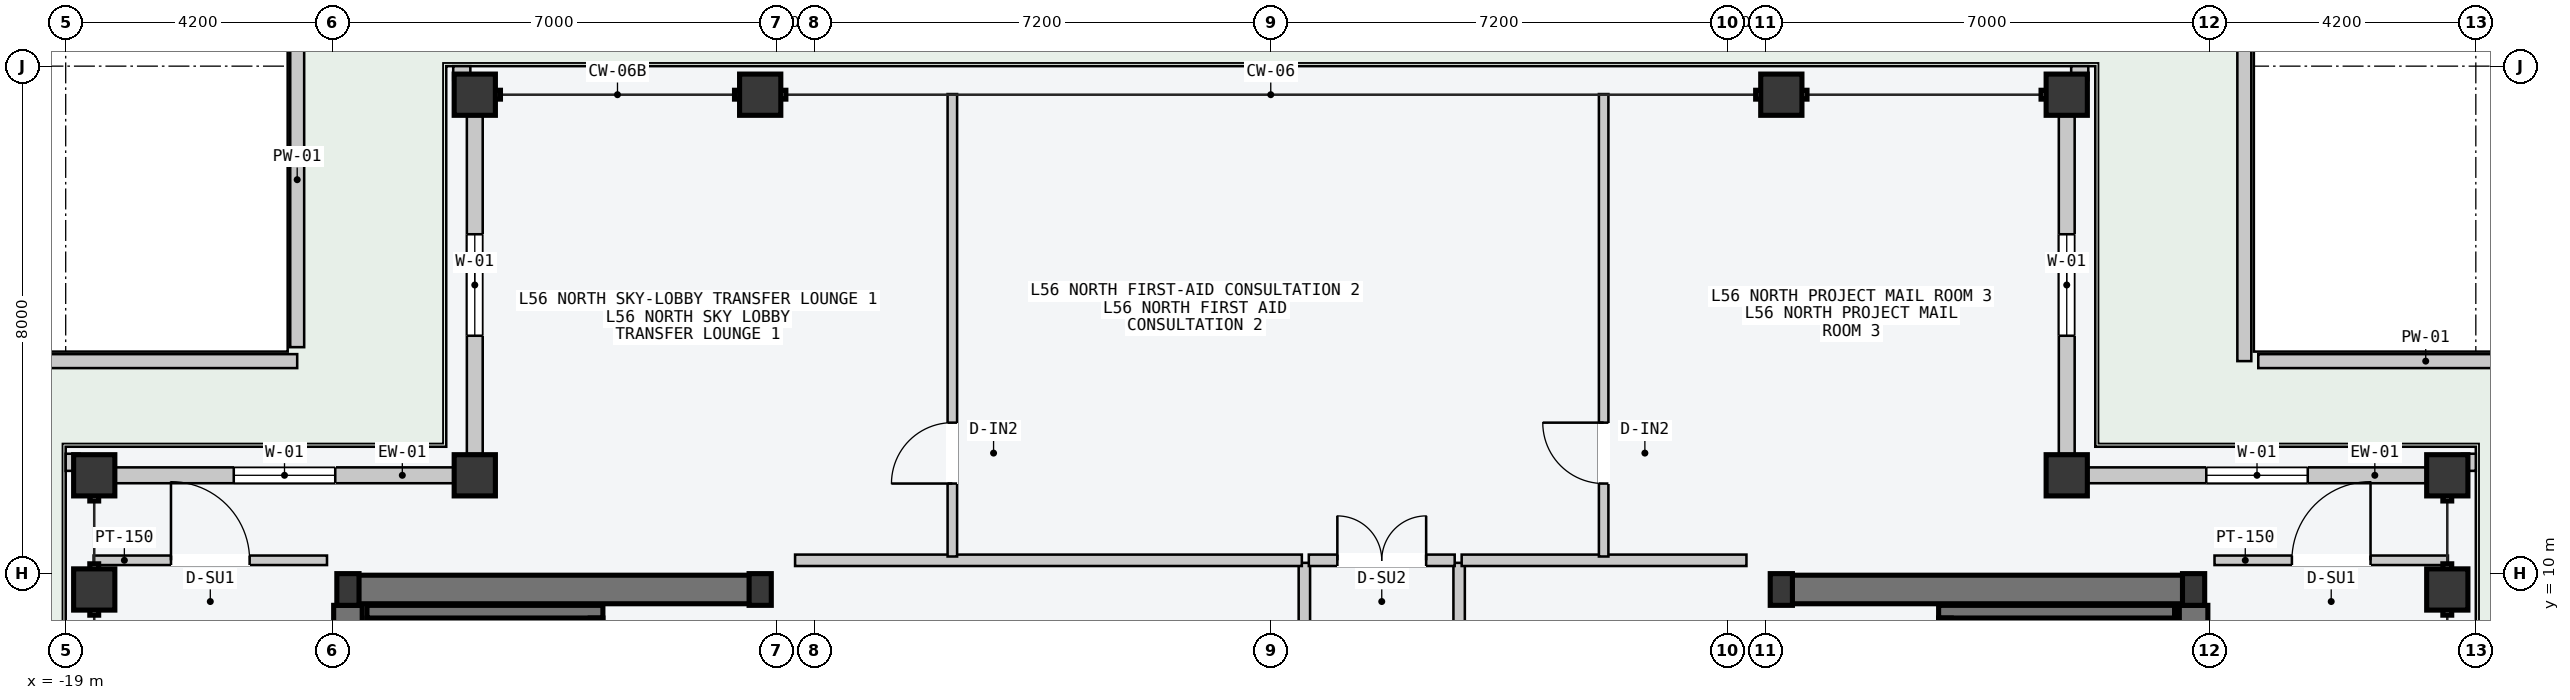
"""IFC4 building model, lengths in metres.
Left out: names, types, materials, properties, quantities, classifications, styles, units other than length and angle.
Written with IfcOpenShell. Run it as: python <this file> out.ifc"""

import sys

from ifc_helpers import new_model, si_unit, direction, frame, frame_2d, origin, origin_2d, place, context, subcontext, project, spatial, rectangle, hollow_rectangle, i_section, extrude, element, fill, save


model = new_model("IFC4")
c1 = context("Model", 3, precision=1e-05, world=origin(), true_north=direction((0.0, 1.0)))
c2 = subcontext(c1, "Body", "Model", "MODEL_VIEW")
j1 = project(units=[si_unit("LENGTHUNIT", "METRE"), si_unit("PLANEANGLEUNIT", "RADIAN")], contexts=[c1])
p1 = place(None, origin())
s1 = spatial("IfcSite", under=j1, at=p1, CompositionType="ELEMENT")
p2 = place(p1, origin())
s2 = spatial("IfcBuilding", under=s1, at=p2, CompositionType="ELEMENT")
p3 = place(p2, frame((0.0, 0.0, 213.9)))
s3 = spatial("IfcBuildingStorey", under=s2, at=p3, CompositionType="ELEMENT", Elevation=213.9)
p4 = place(p3, frame((-14.53, 9.75, -0.2), z_axis=(0.0, 0.0, 1.0), x_axis=(1.0, 0.0, 0.0)))
e1 = element("IfcWall", 1, at=p4, inside=s3, PredefinedType="SHEAR", context=c2, shape_type="SweptSolid", body=[
    extrude(rectangle(XDim=6.46, YDim=0.45, at=frame_2d((3.23, 0.0))), origin(), (0.0, 0.0, 1.0), 4.5),
])
p5 = place(p3, frame((-14.55, 0.25, -0.2), z_axis=(0.0, 0.0, 1.0), x_axis=(0.0, 1.0, 0.0)))
e2 = element("IfcWall", 2, at=p5, inside=s3, PredefinedType="SHEAR", context=c2, shape_type="SweptSolid", body=[
    extrude(rectangle(XDim=9.25, YDim=0.45, at=frame_2d((4.625, 0.0))), origin(), (0.0, 0.0, 1.0), 4.5),
])
p6 = place(p3, frame((8.07, 9.75, -0.2), z_axis=(0.0, 0.0, 1.0), x_axis=(1.0, 0.0, 0.0)))
e3 = element("IfcWall", 3, at=p6, inside=s3, PredefinedType="SHEAR", context=c2, shape_type="SweptSolid", body=[
    extrude(rectangle(XDim=6.46, YDim=0.45, at=frame_2d((3.23, 0.0))), origin(), (0.0, 0.0, 1.0), 4.5),
])
p7 = place(p3, frame((14.55, 0.25, -0.2), z_axis=(0.0, 0.0, 1.0), x_axis=(0.0, 1.0, 0.0)))
e4 = element("IfcWall", 4, at=p7, inside=s3, PredefinedType="SHEAR", context=c2, shape_type="SweptSolid", body=[
    extrude(rectangle(XDim=9.25, YDim=0.45, at=frame_2d((4.625, 0.0))), origin(), (0.0, 0.0, 1.0), 4.5),
])
for number, where, z_axis, x_axis in (
    (5, (-14.15, 1.5, -0.2), (0.0, 0.0, 1.0), (0.0, 1.0, 0.0)),
    (6, (14.15, 1.5, -0.2), (0.0, 0.0, 1.0), (0.0, 1.0, 0.0)),
):
    element("IfcWall", number, at=place(p3, frame(where, z_axis=z_axis, x_axis=x_axis)), inside=s3, PredefinedType="SOLIDWALL", context=c2, shape_type="SweptSolid", body=[
        extrude(rectangle(XDim=7.8, YDim=0.2, at=frame_2d((3.9, 0.0))), origin(), (0.0, 0.0, 1.0), 4.5),
    ])
p8 = place(p3, frame((-14.25, 9.4, -0.2), z_axis=(0.0, 0.0, 1.0), x_axis=(1.0, 0.0, 0.0)))
e7 = element("IfcWall", 7, at=p8, inside=s3, PredefinedType="SOLIDWALL", context=c2, shape_type="SweptSolid", body=[
    extrude(rectangle(XDim=3.72, YDim=0.2, at=frame_2d((1.86, 0.0))), origin(), (0.0, 0.0, 1.0), 4.5),
])
p9 = place(p3, frame((-10.63, 1.5, -0.2), z_axis=(0.0, 0.0, 1.0), x_axis=(0.0, 1.0, 0.0)))
e8 = element("IfcWall", 8, at=p9, inside=s3, PredefinedType="SOLIDWALL", context=c2, shape_type="SweptSolid", body=[
    extrude(rectangle(XDim=7.8, YDim=0.2, at=frame_2d((3.9, 0.0))), origin(), (0.0, 0.0, 1.0), 4.5),
])
p10 = place(p3, frame((10.53, 9.4, -0.2), z_axis=(0.0, 0.0, 1.0), x_axis=(1.0, 0.0, 0.0)))
e9 = element("IfcWall", 9, at=p10, inside=s3, PredefinedType="SOLIDWALL", context=c2, shape_type="SweptSolid", body=[
    extrude(rectangle(XDim=3.72, YDim=0.2, at=frame_2d((1.86, 0.0))), origin(), (0.0, 0.0, 1.0), 4.5),
])
p11 = place(p3, frame((10.63, 1.5, -0.2), z_axis=(0.0, 0.0, 1.0), x_axis=(0.0, 1.0, 0.0)))
e10 = element("IfcWall", 10, at=p11, inside=s3, PredefinedType="SOLIDWALL", context=c2, shape_type="SweptSolid", body=[
    extrude(rectangle(XDim=7.8, YDim=0.2, at=frame_2d((3.9, 0.0))), origin(), (0.0, 0.0, 1.0), 4.5),
])
for number, where, z_axis, x_axis in (
    (11, (-14.55, 9.75, 0.0), (0.0, 0.0, 1.0), (1.0, 0.0, 0.0)),
    (12, (-8.05, 9.75, 0.0), (0.0, 0.0, 1.0), (1.0, 0.0, 0.0)),
    (13, (8.05, 9.75, 0.0), (0.0, 0.0, 1.0), (1.0, 0.0, 0.0)),
    (14, (14.55, 9.75, 0.0), (0.0, 0.0, 1.0), (1.0, 0.0, 0.0)),
):
    element("IfcColumn", number, at=place(p3, frame(where, z_axis=z_axis, x_axis=x_axis)), inside=s3, PredefinedType="COLUMN", context=c2, shape_type="SweptSolid", body=[
        extrude(i_section(OverallWidth=0.35, OverallDepth=0.5, WebThickness=0.02, FlangeThickness=0.032, at=origin_2d()), origin(), (0.0, 0.0, 1.0), 4.5),
    ])
for number, where, z_axis, x_axis in (
    (15, (-12.55, 17.55, -0.2), (0.0, 0.0, 1.0), (1.0, 0.0, 0.0)),
    (16, (-8.05, 17.55, -0.2), (0.0, 0.0, 1.0), (1.0, 0.0, 0.0)),
    (17, (8.05, 17.55, -0.2), (0.0, 0.0, 1.0), (1.0, 0.0, 0.0)),
    (18, (12.55, 17.55, -0.2), (0.0, 0.0, 1.0), (1.0, 0.0, 0.0)),
    (19, (-18.55, 9.75, -0.2), (0.0, 0.0, 1.0), (0.0, 1.0, 0.0)),
    (20, (-18.55, 11.55, -0.2), (0.0, 0.0, 1.0), (0.0, 1.0, 0.0)),
    (21, (18.55, 9.75, -0.2), (0.0, 0.0, 1.0), (0.0, 1.0, 0.0)),
    (22, (18.55, 11.55, -0.2), (0.0, 0.0, 1.0), (0.0, 1.0, 0.0)),
    (23, (-12.55, 11.55, -0.2), (0.0, 0.0, 1.0), (1.0, 0.0, 0.0)),
    (24, (12.55, 11.55, -0.2), (0.0, 0.0, 1.0), (1.0, 0.0, 0.0)),
):
    element("IfcColumn", number, at=place(p3, frame(where, z_axis=z_axis, x_axis=x_axis)), inside=s3, PredefinedType="COLUMN", context=c2, shape_type="SweptSolid", body=[
        extrude(hollow_rectangle(XDim=0.65, YDim=0.65, WallThickness=0.028, at=origin_2d()), origin(), (0.0, 0.0, 1.0), 4.7),
    ])
p12 = place(p3, frame((-18.215, 11.55, 0.0), z_axis=(0.0, 0.0, 1.0), x_axis=(1.0, 0.0, 0.0)))
e25 = element("IfcWall", 25, at=p12, inside=s3, PredefinedType="STANDARD", context=c2, shape_type="SweptSolid", body=[
    extrude(rectangle(XDim=5.33, YDim=0.25, at=frame_2d((2.665, 0.0))), origin(), (0.0, 0.0, 1.0), 3.75),
])
p13 = place(p12, frame((1.865, 0.0, 0.85)))
e26 = element("IfcOpeningElement", 26, at=p13, cuts=e25, PredefinedType="OPENING", context=c2, shape_type="SweptSolid", body=[
    extrude(rectangle(XDim=1.6, YDim=2.0, at=frame_2d((0.8, 1.0))), frame((0.0, 0.135, 0.0), z_axis=(0.0, -1.0, 0.0), x_axis=(1.0, 0.0, 0.0)), (0.0, 0.0, 1.0), 0.27),
])
p14 = place(p3, frame((-12.55, 11.885, 0.0), z_axis=(0.0, 0.0, 1.0), x_axis=(0.0, 1.0, 0.0)))
e27 = element("IfcWall", 27, at=p14, inside=s3, PredefinedType="STANDARD", context=c2, shape_type="SweptSolid", body=[
    extrude(rectangle(XDim=5.33, YDim=0.25, at=frame_2d((2.665, 0.0))), origin(), (0.0, 0.0, 1.0), 3.75),
])
p15 = place(p14, frame((1.865, 0.0, 0.85)))
e28 = element("IfcOpeningElement", 28, at=p15, cuts=e27, PredefinedType="OPENING", context=c2, shape_type="SweptSolid", body=[
    extrude(rectangle(XDim=1.6, YDim=2.0, at=frame_2d((0.8, 1.0))), frame((0.0, 0.135, 0.0), z_axis=(0.0, -1.0, 0.0), x_axis=(1.0, 0.0, 0.0)), (0.0, 0.0, 1.0), 0.27),
])
p16 = place(p3, frame((12.885, 11.55, 0.0), z_axis=(0.0, 0.0, 1.0), x_axis=(1.0, 0.0, 0.0)))
e29 = element("IfcWall", 29, at=p16, inside=s3, PredefinedType="STANDARD", context=c2, shape_type="SweptSolid", body=[
    extrude(rectangle(XDim=5.33, YDim=0.25, at=frame_2d((2.665, 0.0))), origin(), (0.0, 0.0, 1.0), 3.75),
])
p17 = place(p16, frame((1.865, 0.0, 0.85)))
e30 = element("IfcOpeningElement", 30, at=p17, cuts=e29, PredefinedType="OPENING", context=c2, shape_type="SweptSolid", body=[
    extrude(rectangle(XDim=1.6, YDim=2.0, at=frame_2d((0.8, 1.0))), frame((0.0, 0.135, 0.0), z_axis=(0.0, -1.0, 0.0), x_axis=(1.0, 0.0, 0.0)), (0.0, 0.0, 1.0), 0.27),
])
p18 = place(p3, frame((12.55, 11.885, 0.0), z_axis=(0.0, 0.0, 1.0), x_axis=(0.0, 1.0, 0.0)))
e31 = element("IfcWall", 31, at=p18, inside=s3, PredefinedType="STANDARD", context=c2, shape_type="SweptSolid", body=[
    extrude(rectangle(XDim=5.33, YDim=0.25, at=frame_2d((2.665, 0.0))), origin(), (0.0, 0.0, 1.0), 3.75),
])
p19 = place(p18, frame((1.865, 0.0, 0.85)))
e32 = element("IfcOpeningElement", 32, at=p19, cuts=e31, PredefinedType="OPENING", context=c2, shape_type="SweptSolid", body=[
    extrude(rectangle(XDim=1.6, YDim=2.0, at=frame_2d((0.8, 1.0))), frame((0.0, 0.135, 0.0), z_axis=(0.0, -1.0, 0.0), x_axis=(1.0, 0.0, 0.0)), (0.0, 0.0, 1.0), 0.27),
])
for number, where, z_axis, x_axis in (
    (33, (-12.89, 17.89, 0.0), (0.0, 0.0, 1.0), (1.0, 0.0, 0.0)),
    (34, (-18.89, 11.62, 0.0), (0.0, 0.0, 1.0), (0.0, 1.0, 0.0)),
    (35, (12.62, 17.89, 0.0), (0.0, 0.0, 1.0), (1.0, 0.0, 0.0)),
    (36, (18.89, 11.62, 0.0), (0.0, 0.0, 1.0), (0.0, 1.0, 0.0)),
):
    element("IfcWall", number, at=place(p3, frame(where, z_axis=z_axis, x_axis=x_axis)), inside=s3, PredefinedType="PARAPET", context=c2, shape_type="SweptSolid", body=[
        extrude(rectangle(XDim=0.27, YDim=0.22, at=frame_2d((0.135, 0.0))), origin(), (0.0, 0.0, 1.0), 1.2),
    ])
p20 = place(p3, frame((20.85, 13.35, 0.0), z_axis=(0.0, 0.0, 1.0), x_axis=(-1.0, 0.0, 0.0)))
e37 = element("IfcWall", 37, at=p20, inside=s3, PredefinedType="PARAPET", context=c2, shape_type="SweptSolid", body=[
    extrude(rectangle(XDim=5.28, YDim=0.22, at=frame_2d((2.64, 0.0))), origin(), (0.0, 0.0, 1.0), 1.2),
])
p21 = place(p3, frame((15.35, 13.35, 0.0), z_axis=(0.0, 0.0, 1.0), x_axis=(0.0, 1.0, 0.0)))
e38 = element("IfcWall", 38, at=p21, inside=s3, PredefinedType="PARAPET", context=c2, shape_type="SweptSolid", body=[
    extrude(rectangle(XDim=5.28, YDim=0.22, at=frame_2d((2.64, 0.0))), origin(), (0.0, 0.0, 1.0), 1.2),
])
p22 = place(p3, frame((-15.35, 18.85, 0.0), z_axis=(0.0, 0.0, 1.0), x_axis=(0.0, -1.0, 0.0)))
e39 = element("IfcWall", 39, at=p22, inside=s3, PredefinedType="PARAPET", context=c2, shape_type="SweptSolid", body=[
    extrude(rectangle(XDim=5.28, YDim=0.22, at=frame_2d((2.64, 0.0))), origin(), (0.0, 0.0, 1.0), 1.2),
])
p23 = place(p3, frame((-15.35, 13.35, 0.0), z_axis=(0.0, 0.0, 1.0), x_axis=(-1.0, 0.0, 0.0)))
e40 = element("IfcWall", 40, at=p23, inside=s3, PredefinedType="PARAPET", context=c2, shape_type="SweptSolid", body=[
    extrude(rectangle(XDim=5.28, YDim=0.22, at=frame_2d((2.64, 0.0))), origin(), (0.0, 0.0, 1.0), 1.2),
])
p24 = place(p3, frame((0.53, -3.5, 0.0), z_axis=(0.0, 0.0, 1.0), x_axis=(0.0, 1.0, 0.0)))
e41 = element("IfcWall", 41, at=p24, inside=s3, PredefinedType="PARTITIONING", context=c2, shape_type="SweptSolid", body=[
    extrude(rectangle(XDim=13.67, YDim=0.18, at=frame_2d((6.835, 0.0))), origin(), (0.0, 0.0, 1.0), 4.3),
])
p25 = place(p24, frame((6.1, 0.0, 0.0)))
e42 = element("IfcOpeningElement", 42, at=p25, cuts=e41, PredefinedType="OPENING", context=c2, shape_type="SweptSolid", body=[
    extrude(rectangle(XDim=1.24, YDim=2.24, at=frame_2d((0.62, 1.12))), frame((0.0, 0.1, 0.0), z_axis=(0.0, -1.0, 0.0), x_axis=(1.0, 0.0, 0.0)), (0.0, 0.0, 1.0), 0.2),
])
p26 = place(p24, frame((1.6, 0.0, 0.0)))
e43 = element("IfcOpeningElement", 43, at=p26, cuts=e41, PredefinedType="OPENING", context=c2, shape_type="SweptSolid", body=[
    extrude(rectangle(XDim=0.96, YDim=2.18, at=frame_2d((0.48, 1.09))), frame((0.0, 0.1, 0.0), z_axis=(0.0, -1.0, 0.0), x_axis=(1.0, 0.0, 0.0)), (0.0, 0.0, 1.0), 0.2),
])
p27 = place(p3, frame((-7.5, 10.21, 0.0), z_axis=(0.0, 0.0, 1.0), x_axis=(1.0, 0.0, 0.0)))
e44 = element("IfcWall", 44, at=p27, inside=s3, PredefinedType="PARTITIONING", context=c2, shape_type="SweptSolid", body=[
    extrude(rectangle(XDim=7.99, YDim=0.18, at=frame_2d((3.995, 0.0))), origin(), (0.0, 0.0, 1.0), 4.3),
])
p28 = place(p3, frame((2.97, -3.5, 0.0), z_axis=(0.0, 0.0, 1.0), x_axis=(0.0, 1.0, 0.0)))
e45 = element("IfcWall", 45, at=p28, inside=s3, PredefinedType="PARTITIONING", context=c2, shape_type="SweptSolid", body=[
    extrude(rectangle(XDim=13.67, YDim=0.18, at=frame_2d((6.835, 0.0))), origin(), (0.0, 0.0, 1.0), 4.3),
])
p29 = place(p28, frame((6.1, 0.0, 0.0)))
e46 = element("IfcOpeningElement", 46, at=p29, cuts=e45, PredefinedType="OPENING", context=c2, shape_type="SweptSolid", body=[
    extrude(rectangle(XDim=1.24, YDim=2.24, at=frame_2d((0.62, 1.12))), frame((0.0, 0.1, 0.0), z_axis=(0.0, -1.0, 0.0), x_axis=(1.0, 0.0, 0.0)), (0.0, 0.0, 1.0), 0.2),
])
p30 = place(p28, frame((1.6, 0.0, 0.0)))
e47 = element("IfcOpeningElement", 47, at=p30, cuts=e45, PredefinedType="OPENING", context=c2, shape_type="SweptSolid", body=[
    extrude(rectangle(XDim=0.96, YDim=2.18, at=frame_2d((0.48, 1.09))), frame((0.0, 0.1, 0.0), z_axis=(0.0, -1.0, 0.0), x_axis=(1.0, 0.0, 0.0)), (0.0, 0.0, 1.0), 0.2),
])
p31 = place(p3, frame((3.01, 10.21, 0.0), z_axis=(0.0, 0.0, 1.0), x_axis=(1.0, 0.0, 0.0)))
e48 = element("IfcWall", 48, at=p31, inside=s3, PredefinedType="PARTITIONING", context=c2, shape_type="SweptSolid", body=[
    extrude(rectangle(XDim=4.49, YDim=0.18, at=frame_2d((2.245, 0.0))), origin(), (0.0, 0.0, 1.0), 4.3),
])
p32 = place(p3, frame((-5.021, 10.27, 0.0), z_axis=(0.0, 0.0, 1.0), x_axis=(0.0, 1.0, 0.0)))
e49 = element("IfcWall", 49, at=p32, inside=s3, PredefinedType="PARTITIONING", context=c2, shape_type="SweptSolid", body=[
    extrude(rectangle(XDim=7.29, YDim=0.15, at=frame_2d((3.645, 0.0))), origin(), (0.0, 0.0, 1.0), 4.3),
])
p33 = place(p32, frame((1.15, 0.0, 0.0)))
e50 = element("IfcOpeningElement", 50, at=p33, cuts=e49, PredefinedType="OPENING", context=c2, shape_type="SweptSolid", body=[
    extrude(rectangle(XDim=0.96, YDim=2.18, at=frame_2d((0.48, 1.09))), frame((0.0, 0.085, 0.0), z_axis=(0.0, -1.0, 0.0), x_axis=(1.0, 0.0, 0.0)), (0.0, 0.0, 1.0), 0.17),
])
p34 = place(p3, frame((5.249, 10.27, 0.0), z_axis=(0.0, 0.0, 1.0), x_axis=(0.0, 1.0, 0.0)))
e51 = element("IfcWall", 51, at=p34, inside=s3, PredefinedType="PARTITIONING", context=c2, shape_type="SweptSolid", body=[
    extrude(rectangle(XDim=7.29, YDim=0.15, at=frame_2d((3.645, 0.0))), origin(), (0.0, 0.0, 1.0), 4.3),
])
p35 = place(p34, frame((1.15, 0.0, 0.0)))
e52 = element("IfcOpeningElement", 52, at=p35, cuts=e51, PredefinedType="OPENING", context=c2, shape_type="SweptSolid", body=[
    extrude(rectangle(XDim=0.96, YDim=2.18, at=frame_2d((0.48, 1.09))), frame((0.0, 0.085, 0.0), z_axis=(0.0, -1.0, 0.0), x_axis=(1.0, 0.0, 0.0)), (0.0, 0.0, 1.0), 0.17),
])
p36 = place(p3, frame((0.6, 10.21, 0.0), z_axis=(0.0, 0.0, 1.0), x_axis=(1.0, 0.0, 0.0)))
e53 = element("IfcWall", 53, at=p36, inside=s3, PredefinedType="PARTITIONING", context=c2, shape_type="SweptSolid", body=[
    extrude(rectangle(XDim=2.3, YDim=0.18, at=frame_2d((1.15, 0.0))), origin(), (0.0, 0.0, 1.0), 4.3),
])
p37 = place(p36, frame((0.45, 0.0, 0.0)))
e54 = element("IfcOpeningElement", 54, at=p37, cuts=e53, PredefinedType="OPENING", context=c2, shape_type="SweptSolid", body=[
    extrude(rectangle(XDim=1.4, YDim=2.2, at=frame_2d((0.7, 1.1))), frame((0.0, 0.1, 0.0), z_axis=(0.0, -1.0, 0.0), x_axis=(1.0, 0.0, 0.0)), (0.0, 0.0, 1.0), 0.2),
])
p38 = place(p3, frame((-18.56, 10.21, 0.0), z_axis=(0.0, 0.0, 1.0), x_axis=(1.0, 0.0, 0.0)))
e55 = element("IfcWall", 55, at=p38, inside=s3, PredefinedType="PARTITIONING", context=c2, shape_type="SweptSolid", body=[
    extrude(rectangle(XDim=3.68, YDim=0.15, at=frame_2d((1.84, 0.0))), origin(), (0.0, 0.0, 1.0), 4.3),
])
p39 = place(p38, frame((1.22, 0.0, 0.0)))
e56 = element("IfcOpeningElement", 56, at=p39, cuts=e55, PredefinedType="OPENING", context=c2, shape_type="SweptSolid", body=[
    extrude(rectangle(XDim=1.24, YDim=2.24, at=frame_2d((0.62, 1.12))), frame((0.0, 0.085, 0.0), z_axis=(0.0, -1.0, 0.0), x_axis=(1.0, 0.0, 0.0)), (0.0, 0.0, 1.0), 0.17),
])
p40 = place(p3, frame((14.88, 10.21, 0.0), z_axis=(0.0, 0.0, 1.0), x_axis=(1.0, 0.0, 0.0)))
e57 = element("IfcWall", 57, at=p40, inside=s3, PredefinedType="PARTITIONING", context=c2, shape_type="SweptSolid", body=[
    extrude(rectangle(XDim=3.68, YDim=0.15, at=frame_2d((1.84, 0.0))), origin(), (0.0, 0.0, 1.0), 4.3),
])
p41 = place(p40, frame((1.22, 0.0, 0.0)))
e58 = element("IfcOpeningElement", 58, at=p41, cuts=e57, PredefinedType="OPENING", context=c2, shape_type="SweptSolid", body=[
    extrude(rectangle(XDim=1.24, YDim=2.24, at=frame_2d((0.62, 1.12))), frame((0.0, 0.085, 0.0), z_axis=(0.0, -1.0, 0.0), x_axis=(1.0, 0.0, 0.0)), (0.0, 0.0, 1.0), 0.17),
])
p42 = place(p13, origin())
e59 = element("IfcWindow", 59, at=p42, inside=s3, PartitioningType="SINGLE_PANEL", PredefinedType="WINDOW", context=c2, shape_type="SweptSolid", body=[
    extrude(rectangle(XDim=1.6, YDim=2.0, at=frame_2d((0.8, 1.0))), frame((0.0, 0.03, 0.0), z_axis=(0.0, -1.0, 0.0), x_axis=(1.0, 0.0, 0.0)), (0.0, 0.0, 1.0), 0.06),
])
fill(e26, e59)
p43 = place(p15, origin())
e60 = element("IfcWindow", 60, at=p43, inside=s3, PartitioningType="SINGLE_PANEL", PredefinedType="WINDOW", context=c2, shape_type="SweptSolid", body=[
    extrude(rectangle(XDim=1.6, YDim=2.0, at=frame_2d((0.8, 1.0))), frame((0.0, 0.03, 0.0), z_axis=(0.0, -1.0, 0.0), x_axis=(1.0, 0.0, 0.0)), (0.0, 0.0, 1.0), 0.06),
])
fill(e28, e60)
p44 = place(p17, origin())
e61 = element("IfcWindow", 61, at=p44, inside=s3, PartitioningType="SINGLE_PANEL", PredefinedType="WINDOW", context=c2, shape_type="SweptSolid", body=[
    extrude(rectangle(XDim=1.6, YDim=2.0, at=frame_2d((0.8, 1.0))), frame((0.0, 0.03, 0.0), z_axis=(0.0, -1.0, 0.0), x_axis=(1.0, 0.0, 0.0)), (0.0, 0.0, 1.0), 0.06),
])
fill(e30, e61)
p45 = place(p19, origin())
e62 = element("IfcWindow", 62, at=p45, inside=s3, PartitioningType="SINGLE_PANEL", PredefinedType="WINDOW", context=c2, shape_type="SweptSolid", body=[
    extrude(rectangle(XDim=1.6, YDim=2.0, at=frame_2d((0.8, 1.0))), frame((0.0, 0.03, 0.0), z_axis=(0.0, -1.0, 0.0), x_axis=(1.0, 0.0, 0.0)), (0.0, 0.0, 1.0), 0.06),
])
fill(e32, e62)
p46 = place(p33, origin())
e63 = element("IfcDoor", 63, at=p46, inside=s3, OperationType="SINGLE_SWING_LEFT", PredefinedType="DOOR", context=c2, shape_type="SweptSolid", body=[
    extrude(rectangle(XDim=0.96, YDim=2.18, at=frame_2d((0.48, 1.09))), frame((0.0, 0.025, 0.0), z_axis=(0.0, -1.0, 0.0), x_axis=(1.0, 0.0, 0.0)), (0.0, 0.0, 1.0), 0.05),
])
fill(e50, e63)
p47 = place(p35, origin())
e64 = element("IfcDoor", 64, at=p47, inside=s3, OperationType="SINGLE_SWING_RIGHT", PredefinedType="DOOR", context=c2, shape_type="SweptSolid", body=[
    extrude(rectangle(XDim=0.96, YDim=2.18, at=frame_2d((0.48, 1.09))), frame((0.0, 0.025, 0.0), z_axis=(0.0, -1.0, 0.0), x_axis=(1.0, 0.0, 0.0)), (0.0, 0.0, 1.0), 0.05),
])
fill(e52, e64)
p48 = place(p37, origin())
e65 = element("IfcDoor", 65, at=p48, inside=s3, OperationType="DOUBLE_DOOR_SINGLE_SWING", PredefinedType="DOOR", context=c2, shape_type="SweptSolid", body=[
    extrude(rectangle(XDim=1.4, YDim=2.2, at=frame_2d((0.7, 1.1))), frame((0.0, 0.025, 0.0), z_axis=(0.0, -1.0, 0.0), x_axis=(1.0, 0.0, 0.0)), (0.0, 0.0, 1.0), 0.05),
])
fill(e54, e65)
p49 = place(p39, origin())
e66 = element("IfcDoor", 66, at=p49, inside=s3, OperationType="SINGLE_SWING_LEFT", PredefinedType="DOOR", context=c2, shape_type="SweptSolid", body=[
    extrude(rectangle(XDim=1.24, YDim=2.24, at=frame_2d((0.62, 1.12))), frame((0.0, 0.025, 0.0), z_axis=(0.0, -1.0, 0.0), x_axis=(1.0, 0.0, 0.0)), (0.0, 0.0, 1.0), 0.05),
])
fill(e56, e66)
p50 = place(p41, origin())
e67 = element("IfcDoor", 67, at=p50, inside=s3, OperationType="SINGLE_SWING_RIGHT", PredefinedType="DOOR", context=c2, shape_type="SweptSolid", body=[
    extrude(rectangle(XDim=1.24, YDim=2.24, at=frame_2d((0.62, 1.12))), frame((0.0, 0.025, 0.0), z_axis=(0.0, -1.0, 0.0), x_axis=(1.0, 0.0, 0.0)), (0.0, 0.0, 1.0), 0.05),
])
fill(e58, e67)
save(model, sys.argv[1])
